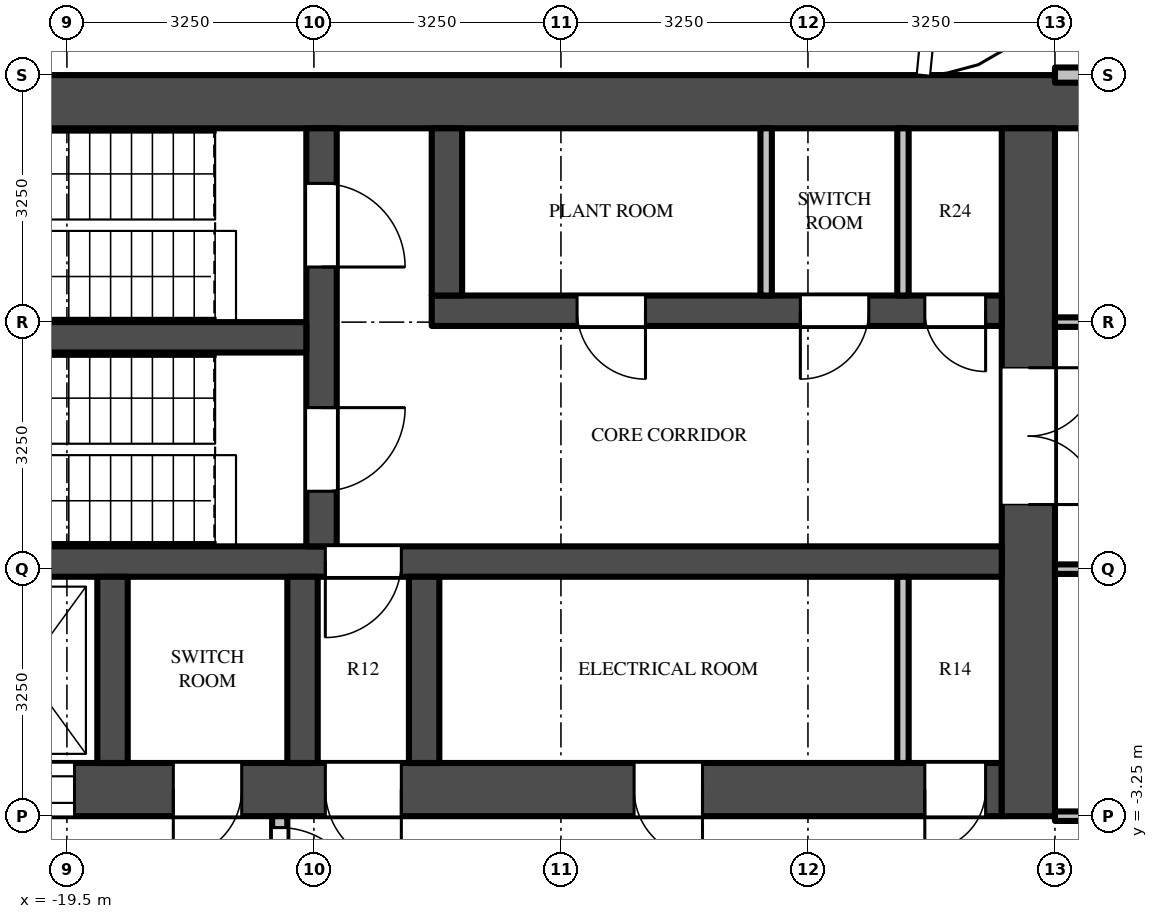
"""IFC4 building model, lengths in metres.
Left out: names, types, materials, properties, quantities, classifications, styles, units other than length and angle.
Written with IfcOpenShell. Run it as: python <this file> out.ifc"""

import sys

from ifc_helpers import new_model, si_unit, direction, frame, frame_2d, origin, place, context, subcontext, project, spatial, rectangle, extrude, source, transform, mapped, element, fill, save


model = new_model("IFC4")
c1 = context("Model", 3, precision=1e-05, world=origin(), true_north=direction((0.0, 1.0)))
c2 = subcontext(c1, "Body", "Model", "MODEL_VIEW")
j1 = project(units=[si_unit("LENGTHUNIT", "METRE"), si_unit("PLANEANGLEUNIT", "RADIAN")], contexts=[c1])
p1 = place(None, origin())
s1 = spatial("IfcSite", under=j1, at=p1, CompositionType="ELEMENT")
p2 = place(p1, origin())
s2 = spatial("IfcBuilding", under=s1, at=p2, CompositionType="ELEMENT")
p3 = place(p2, frame((0.0, 0.0, 354.1)))
s3 = spatial("IfcBuildingStorey", under=s2, at=p3, CompositionType="ELEMENT", Elevation=354.1)
m1 = source(origin(), c2, "Body", "SweptSolid", [
    extrude(rectangle(XDim=16.75, YDim=0.7, at=frame_2d((8.375, 0.0))), origin(), (0.0, 0.0, 1.0), 3.75),
])
p4 = place(p3, frame((-6.0, 6.15, 0.0), z_axis=(0.0, 0.0, 1.0), x_axis=(-1.0, 0.0, 0.0)))
e1 = element("IfcWall", 1, at=p4, inside=s3, PredefinedType="SHEAR", context=c2, shape_type="MappedRepresentation", body=[
    mapped(m1, transform((0.0, 0.0, 0.0))),
])
m2 = source(origin(), c2, "Body", "SweptSolid", [
    extrude(rectangle(XDim=14.85, YDim=0.7, at=frame_2d((7.425, 0.0))), origin(), (0.0, 0.0, 1.0), 3.75),
])
p5 = place(p3, frame((-7.2, -2.9, 0.0), z_axis=(0.0, 0.0, 1.0), x_axis=(-1.0, 0.0, 0.0)))
e2 = element("IfcWall", 2, at=p5, inside=s3, PredefinedType="SHEAR", context=c2, shape_type="MappedRepresentation", body=[
    mapped(m2, transform((0.0, 0.0, 0.0))),
])
m3 = source(origin(), c2, "Body", "SweptSolid", [
    extrude(rectangle(XDim=1.3, YDim=2.1, at=frame_2d((0.65, 1.05))), frame((0.0, 0.36, 0.0), z_axis=(0.0, -1.0, 0.0), x_axis=(1.0, 0.0, 0.0)), (0.0, 0.0, 1.0), 0.72),
])
p6 = place(p5, frame((12.2, 0.0, 0.0)))
e3 = element("IfcOpeningElement", 3, at=p6, cuts=e2, PredefinedType="OPENING", context=c2, shape_type="MappedRepresentation", body=[
    mapped(m3, transform((0.0, 0.0, 0.0))),
])
m4 = source(origin(), c2, "Body", "SweptSolid", [
    extrude(rectangle(XDim=1.0, YDim=2.1, at=frame_2d((0.5, 1.05))), frame((0.0, 0.36, 0.0), z_axis=(0.0, -1.0, 0.0), x_axis=(1.0, 0.0, 0.0)), (0.0, 0.0, 1.0), 0.72),
])
p7 = place(p5, frame((7.9, 0.0, 0.0)))
e4 = element("IfcOpeningElement", 4, at=p7, cuts=e2, PredefinedType="OPENING", context=c2, shape_type="MappedRepresentation", body=[
    mapped(m4, transform((0.0, 0.0, 0.0))),
])
m5 = source(origin(), c2, "Body", "SweptSolid", [
    extrude(rectangle(XDim=0.8, YDim=2.1, at=frame_2d((0.4, 1.05))), frame((0.0, 0.36, 0.0), z_axis=(0.0, -1.0, 0.0), x_axis=(1.0, 0.0, 0.0)), (0.0, 0.0, 1.0), 0.72),
])
p8 = place(p5, frame((0.212, 0.0, 0.0)))
e5 = element("IfcOpeningElement", 5, at=p8, cuts=e2, PredefinedType="OPENING", context=c2, shape_type="MappedRepresentation", body=[
    mapped(m5, transform((0.0, 0.0, 0.0))),
])
m6 = source(origin(), c2, "Body", "SweptSolid", [
    extrude(rectangle(XDim=0.9, YDim=2.1, at=frame_2d((0.45, 1.05))), frame((0.0, 0.36, 0.0), z_axis=(0.0, -1.0, 0.0), x_axis=(1.0, 0.0, 0.0)), (0.0, 0.0, 1.0), 0.72),
])
p9 = place(p5, frame((3.938, 0.0, 0.0)))
e6 = element("IfcOpeningElement", 6, at=p9, cuts=e2, PredefinedType="OPENING", context=c2, shape_type="MappedRepresentation", body=[
    mapped(m6, transform((0.0, 0.0, 0.0))),
])
p10 = place(p5, frame((10.0, 0.0, 0.0)))
e7 = element("IfcOpeningElement", 7, at=p10, cuts=e2, PredefinedType="OPENING", context=c2, shape_type="MappedRepresentation", body=[
    mapped(m6, transform((0.0, 0.0, 0.0))),
])
m7 = source(origin(), c2, "Body", "SweptSolid", [
    extrude(rectangle(XDim=9.05, YDim=0.7, at=frame_2d((4.525, 0.0))), origin(), (0.0, 0.0, 1.0), 3.75),
])
p11 = place(p3, frame((-6.85, 5.8, 0.0), z_axis=(0.0, 0.0, 1.0), x_axis=(0.0, -1.0, 0.0)))
e8 = element("IfcWall", 8, at=p11, inside=s3, PredefinedType="SHEAR", context=c2, shape_type="MappedRepresentation", body=[
    mapped(m7, transform((0.0, 0.0, 0.0))),
])
m8 = source(origin(), c2, "Body", "SweptSolid", [
    extrude(rectangle(XDim=1.8, YDim=2.1, at=frame_2d((0.9, 1.05))), frame((0.0, 0.36, 0.0), z_axis=(0.0, -1.0, 0.0), x_axis=(1.0, 0.0, 0.0)), (0.0, 0.0, 1.0), 0.72),
])
p12 = place(p11, frame((3.15, 0.0, 0.0)))
e9 = element("IfcOpeningElement", 9, at=p12, cuts=e8, PredefinedType="OPENING", context=c2, shape_type="MappedRepresentation", body=[
    mapped(m8, transform((0.0, 0.0, 0.0))),
])
m9 = source(origin(), c2, "Body", "SweptSolid", [
    extrude(rectangle(XDim=7.5, YDim=0.4, at=frame_2d((3.75, 0.0))), origin(), (0.0, 0.0, 1.0), 3.75),
])
p13 = place(p3, frame((-7.2, 3.4, 0.0), z_axis=(0.0, 0.0, 1.0), x_axis=(-1.0, 0.0, 0.0)))
e10 = element("IfcWall", 10, at=p13, inside=s3, PredefinedType="SHEAR", context=c2, shape_type="MappedRepresentation", body=[
    mapped(m9, transform((0.0, 0.0, 0.0))),
])
m10 = source(origin(), c2, "Body", "SweptSolid", [
    extrude(rectangle(XDim=0.8, YDim=2.1, at=frame_2d((0.4, 1.05))), frame((0.0, 0.21, 0.0), z_axis=(0.0, -1.0, 0.0), x_axis=(1.0, 0.0, 0.0)), (0.0, 0.0, 1.0), 0.42),
])
p14 = place(p13, frame((0.212, 0.0, 0.0)))
e11 = element("IfcOpeningElement", 11, at=p14, cuts=e10, PredefinedType="OPENING", context=c2, shape_type="MappedRepresentation", body=[
    mapped(m10, transform((0.0, 0.0, 0.0))),
])
m11 = source(origin(), c2, "Body", "SweptSolid", [
    extrude(rectangle(XDim=0.9, YDim=2.1, at=frame_2d((0.45, 1.05))), frame((0.0, 0.21, 0.0), z_axis=(0.0, -1.0, 0.0), x_axis=(1.0, 0.0, 0.0)), (0.0, 0.0, 1.0), 0.42),
])
p15 = place(p13, frame((1.75, 0.0, 0.0)))
e12 = element("IfcOpeningElement", 12, at=p15, cuts=e10, PredefinedType="OPENING", context=c2, shape_type="MappedRepresentation", body=[
    mapped(m11, transform((0.0, 0.0, 0.0))),
])
p16 = place(p13, frame((4.688, 0.0, 0.0)))
e13 = element("IfcOpeningElement", 13, at=p16, cuts=e10, PredefinedType="OPENING", context=c2, shape_type="MappedRepresentation", body=[
    mapped(m11, transform((0.0, 0.0, 0.0))),
])
m12 = source(origin(), c2, "Body", "SweptSolid", [
    extrude(rectangle(XDim=14.85, YDim=0.4, at=frame_2d((7.425, 0.0))), origin(), (0.0, 0.0, 1.0), 3.75),
])
p17 = place(p3, frame((-7.2, 0.1, 0.0), z_axis=(0.0, 0.0, 1.0), x_axis=(-1.0, 0.0, 0.0)))
e14 = element("IfcWall", 14, at=p17, inside=s3, PredefinedType="SHEAR", context=c2, shape_type="MappedRepresentation", body=[
    mapped(m12, transform((0.0, 0.0, 0.0))),
])
m13 = source(origin(), c2, "Body", "SweptSolid", [
    extrude(rectangle(XDim=1.0, YDim=2.1, at=frame_2d((0.5, 1.05))), frame((0.0, 0.21, 0.0), z_axis=(0.0, -1.0, 0.0), x_axis=(1.0, 0.0, 0.0)), (0.0, 0.0, 1.0), 0.42),
])
p18 = place(p17, frame((7.9, 0.0, 0.0)))
e15 = element("IfcOpeningElement", 15, at=p18, cuts=e14, PredefinedType="OPENING", context=c2, shape_type="MappedRepresentation", body=[
    mapped(m13, transform((0.0, 0.0, 0.0))),
])
m14 = source(origin(), c2, "Body", "SweptSolid", [
    extrude(rectangle(XDim=5.5, YDim=0.4, at=frame_2d((2.75, 0.0))), origin(), (0.0, 0.0, 1.0), 3.75),
])
p19 = place(p3, frame((-16.15, 5.8, 0.0), z_axis=(0.0, 0.0, 1.0), x_axis=(0.0, -1.0, 0.0)))
e16 = element("IfcWall", 16, at=p19, inside=s3, PredefinedType="SHEAR", context=c2, shape_type="MappedRepresentation", body=[
    mapped(m14, transform((0.0, 0.0, 0.0))),
])
m15 = source(origin(), c2, "Body", "SweptSolid", [
    extrude(rectangle(XDim=1.1, YDim=2.1, at=frame_2d((0.55, 1.05))), frame((0.0, 0.21, 0.0), z_axis=(0.0, -1.0, 0.0), x_axis=(1.0, 0.0, 0.0)), (0.0, 0.0, 1.0), 0.42),
])
p20 = place(p19, frame((0.725, 0.0, 0.0)))
e17 = element("IfcOpeningElement", 17, at=p20, cuts=e16, PredefinedType="OPENING", context=c2, shape_type="MappedRepresentation", body=[
    mapped(m15, transform((0.0, 0.0, 0.0))),
])
p21 = place(p19, frame((3.675, 0.0, 0.0)))
e18 = element("IfcOpeningElement", 18, at=p21, cuts=e16, PredefinedType="OPENING", context=c2, shape_type="MappedRepresentation", body=[
    mapped(m15, transform((0.0, 0.0, 0.0))),
])
m16 = source(origin(), c2, "Body", "SweptSolid", [
    extrude(rectangle(XDim=5.7, YDim=0.4, at=frame_2d((2.85, 0.0))), origin(), (0.0, 0.0, 1.0), 3.75),
])
p22 = place(p3, frame((-16.35, 3.05, 0.0), z_axis=(0.0, 0.0, 1.0), x_axis=(-1.0, 0.0, 0.0)))
e19 = element("IfcWall", 19, at=p22, inside=s3, PredefinedType="SHEAR", context=c2, shape_type="MappedRepresentation", body=[
    mapped(m16, transform((0.0, 0.0, 0.0))),
])
m17 = source(origin(), c2, "Body", "SweptSolid", [
    extrude(rectangle(XDim=2.2, YDim=0.4, at=frame_2d((1.1, 0.0))), origin(), (0.0, 0.0, 1.0), 3.75),
])
p23 = place(p3, frame((-14.5, 5.8, 0.0), z_axis=(0.0, 0.0, 1.0), x_axis=(0.0, -1.0, 0.0)))
e20 = element("IfcWall", 20, at=p23, inside=s3, PredefinedType="SHEAR", context=c2, shape_type="MappedRepresentation", body=[
    mapped(m17, transform((0.0, 0.0, 0.0))),
])
m18 = source(origin(), c2, "Body", "SweptSolid", [
    extrude(rectangle(XDim=2.45, YDim=0.4, at=frame_2d((1.225, 0.0))), origin(), (0.0, 0.0, 1.0), 3.75),
])
for number, where, z_axis, x_axis in (
    (21, (-14.8, -0.1, 0.0), (0.0, 0.0, 1.0), (0.0, -1.0, 0.0)),
    (22, (-16.4, -0.1, 0.0), (0.0, 0.0, 1.0), (0.0, -1.0, 0.0)),
    (23, (-18.9, -0.1, 0.0), (0.0, 0.0, 1.0), (0.0, -1.0, 0.0)),
):
    element("IfcWall", number, at=place(p3, frame(where, z_axis=z_axis, x_axis=x_axis)), inside=s3, PredefinedType="SHEAR", context=c2, shape_type="MappedRepresentation", body=[
        mapped(m18, transform((0.0, 0.0, 0.0))),
    ])
m19 = source(origin(), c2, "Body", "SweptSolid", [
    extrude(rectangle(XDim=3.25, YDim=0.2, at=frame_2d((1.625, 0.0))), origin(), (0.0, 0.0, 1.0), 3.75),
])
p24 = place(p3, frame((-16.7, -3.25, 0.0), z_axis=(0.0, 0.0, 1.0), x_axis=(0.0, -1.0, 0.0)))
e24 = element("IfcWall", 24, at=p24, inside=s3, PredefinedType="PARTITIONING", context=c2, shape_type="MappedRepresentation", body=[
    mapped(m19, transform((0.0, 0.0, 0.0))),
])
m20 = source(origin(), c2, "Body", "SweptSolid", [
    extrude(rectangle(XDim=1.1, YDim=2.1, at=frame_2d((0.55, 1.05))), frame((0.0, 0.11, 0.0), z_axis=(0.0, -1.0, 0.0), x_axis=(1.0, 0.0, 0.0)), (0.0, 0.0, 1.0), 0.22),
])
p25 = place(p24, frame((0.15, 0.0, 0.0)))
e25 = element("IfcOpeningElement", 25, at=p25, cuts=e24, PredefinedType="OPENING", context=c2, shape_type="MappedRepresentation", body=[
    mapped(m20, transform((0.0, 0.0, 0.0))),
])
m21 = source(origin(), c2, "Body", "SweptSolid", [
    extrude(rectangle(XDim=2.2, YDim=0.15, at=frame_2d((1.1, 0.0))), origin(), (0.0, 0.0, 1.0), 3.75),
])
for number, where, z_axis, x_axis in (
    (26, (-8.5, 5.8, 0.0), (0.0, 0.0, 1.0), (0.0, -1.0, 0.0)),
    (27, (-10.3, 5.8, 0.0), (0.0, 0.0, 1.0), (0.0, -1.0, 0.0)),
):
    element("IfcWall", number, at=place(p3, frame(where, z_axis=z_axis, x_axis=x_axis)), inside=s3, PredefinedType="PARTITIONING", context=c2, shape_type="MappedRepresentation", body=[
        mapped(m21, transform((0.0, 0.0, 0.0))),
    ])
m22 = source(origin(), c2, "Body", "SweptSolid", [
    extrude(rectangle(XDim=2.45, YDim=0.15, at=frame_2d((1.225, 0.0))), origin(), (0.0, 0.0, 1.0), 3.75),
])
p26 = place(p3, frame((-8.5, -0.1, 0.0), z_axis=(0.0, 0.0, 1.0), x_axis=(0.0, -1.0, 0.0)))
e28 = element("IfcWall", 28, at=p26, inside=s3, PredefinedType="PARTITIONING", context=c2, shape_type="MappedRepresentation", body=[
    mapped(m22, transform((0.0, 0.0, 0.0))),
])
m23 = source(origin(), c2, "Body", "SweptSolid", [
    extrude(rectangle(XDim=5.363, YDim=0.125, at=frame_2d((2.681, 0.0))), origin(), (0.0, 0.0, 1.0), 3.046),
])
p27 = place(p3, frame((-1.137, -3.25, 0.0), z_axis=(0.0, 0.0, 1.0), x_axis=(-1.0, 0.0, 0.0)))
e29 = element("IfcWall", 29, at=p27, inside=s3, PredefinedType="PARTITIONING", context=c2, shape_type="MappedRepresentation", body=[
    mapped(m23, transform((0.0, 0.0, 0.0))),
])
m24 = source(origin(), c2, "Body", "SweptSolid", [
    extrude(rectangle(XDim=1.0, YDim=2.1, at=frame_2d((0.5, 1.05))), frame((0.0, 0.073, 0.0), z_axis=(0.0, -1.0, 0.0), x_axis=(1.0, 0.0, 0.0)), (0.0, 0.0, 1.0), 0.145),
])
p28 = place(p27, frame((4.012, 0.0, 0.0)))
e30 = element("IfcOpeningElement", 30, at=p28, cuts=e29, PredefinedType="OPENING", context=c2, shape_type="MappedRepresentation", body=[
    mapped(m24, transform((0.0, 0.0, 0.0))),
])
p29 = place(p3, frame((-1.137, 0.0, 0.0), z_axis=(0.0, 0.0, 1.0), x_axis=(-1.0, 0.0, 0.0)))
e31 = element("IfcWall", 31, at=p29, inside=s3, PredefinedType="PARTITIONING", context=c2, shape_type="MappedRepresentation", body=[
    mapped(m23, transform((0.0, 0.0, 0.0))),
])
p30 = place(p3, frame((-6.5, 3.25, 0.0), z_axis=(0.0, 0.0, 1.0), x_axis=(1.0, 0.0, 0.0)))
e32 = element("IfcWall", 32, at=p30, inside=s3, PredefinedType="PARTITIONING", context=c2, shape_type="MappedRepresentation", body=[
    mapped(m23, transform((0.0, 0.0, 0.0))),
])
p31 = place(p30, frame((1.3, 0.0, 0.0)))
e33 = element("IfcOpeningElement", 33, at=p31, cuts=e32, PredefinedType="OPENING", context=c2, shape_type="MappedRepresentation", body=[
    mapped(m24, transform((0.0, 0.0, 0.0))),
])
m25 = source(origin(), c2, "Body", "SweptSolid", [
    extrude(rectangle(XDim=5.363, YDim=0.2, at=frame_2d((2.681, 0.0))), origin(), (0.0, 0.0, 1.0), 2.83),
])
p32 = place(p3, frame((-6.5, 6.5, 0.0), z_axis=(0.0, 0.0, 1.0), x_axis=(1.0, 0.0, 0.0)))
e34 = element("IfcWall", 34, at=p32, inside=s3, PredefinedType="PARTITIONING", context=c2, shape_type="MappedRepresentation", body=[
    mapped(m25, transform((0.0, 0.0, 0.0))),
])
m26 = source(origin(), c2, "Body", "SweptSolid", [
    extrude(rectangle(XDim=1.3, YDim=2.1, at=frame_2d((0.65, 1.05))), frame((0.0, -0.275, 0.0), z_axis=(0.0, -1.0, 0.0), x_axis=(1.0, 0.0, 0.0)), (0.0, 0.0, 1.0), 0.05),
])
p33 = place(p6, origin())
e35 = element("IfcDoor", 35, at=p33, inside=s3, OperationType="DOUBLE_DOOR_SLIDING", PredefinedType="DOOR", context=c2, shape_type="MappedRepresentation", body=[
    mapped(m26, transform((0.0, 0.0, 0.0))),
])
fill(e3, e35)
m27 = source(origin(), c2, "Body", "SweptSolid", [
    extrude(rectangle(XDim=1.8, YDim=2.1, at=frame_2d((0.9, 1.05))), frame((0.0, -0.275, 0.0), z_axis=(0.0, -1.0, 0.0), x_axis=(1.0, 0.0, 0.0)), (0.0, 0.0, 1.0), 0.05),
])
p34 = place(p12, origin())
e36 = element("IfcDoor", 36, at=p34, inside=s3, OperationType="DOUBLE_DOOR_SINGLE_SWING", PredefinedType="DOOR", context=c2, shape_type="MappedRepresentation", body=[
    mapped(m27, transform((0.0, 0.0, 0.0))),
])
fill(e9, e36)
m28 = source(origin(), c2, "Body", "SweptSolid", [
    extrude(rectangle(XDim=1.1, YDim=2.1, at=frame_2d((0.55, 1.05))), frame((0.0, 0.025, 0.0), z_axis=(0.0, -1.0, 0.0), x_axis=(1.0, 0.0, 0.0)), (0.0, 0.0, 1.0), 0.05),
])
p35 = place(p20, origin())
e37 = element("IfcDoor", 37, at=p35, inside=s3, OperationType="SINGLE_SWING_RIGHT", PredefinedType="DOOR", context=c2, shape_type="MappedRepresentation", body=[
    mapped(m28, transform((0.0, 0.0, 0.0))),
])
fill(e17, e37)
p36 = place(p21, origin())
e38 = element("IfcDoor", 38, at=p36, inside=s3, OperationType="SINGLE_SWING_LEFT", PredefinedType="DOOR", context=c2, shape_type="MappedRepresentation", body=[
    mapped(m28, transform((0.0, 0.0, 0.0))),
])
fill(e18, e38)
m29 = source(origin(), c2, "Body", "SweptSolid", [
    extrude(rectangle(XDim=1.0, YDim=2.1, at=frame_2d((0.5, 1.05))), frame((0.0, 0.025, 0.0), z_axis=(0.0, -1.0, 0.0), x_axis=(1.0, 0.0, 0.0)), (0.0, 0.0, 1.0), 0.05),
])
p37 = place(p18, origin())
e39 = element("IfcDoor", 39, at=p37, inside=s3, OperationType="SINGLE_SWING_RIGHT", PredefinedType="DOOR", context=c2, shape_type="MappedRepresentation", body=[
    mapped(m29, transform((0.0, 0.0, 0.0))),
])
fill(e15, e39)
m30 = source(origin(), c2, "Body", "SweptSolid", [
    extrude(rectangle(XDim=1.0, YDim=2.1, at=frame_2d((0.5, 1.05))), frame((0.0, -0.275, 0.0), z_axis=(0.0, -1.0, 0.0), x_axis=(1.0, 0.0, 0.0)), (0.0, 0.0, 1.0), 0.05),
])
p38 = place(p7, origin())
e40 = element("IfcDoor", 40, at=p38, inside=s3, OperationType="SINGLE_SWING_LEFT", PredefinedType="DOOR", context=c2, shape_type="MappedRepresentation", body=[
    mapped(m30, transform((0.0, 0.0, 0.0))),
])
fill(e4, e40)
p39 = place(p25, origin())
e41 = element("IfcDoor", 41, at=p39, inside=s3, OperationType="SINGLE_SWING_RIGHT", PredefinedType="DOOR", context=c2, shape_type="MappedRepresentation", body=[
    mapped(m28, transform((0.0, 0.0, 0.0))),
])
fill(e25, e41)
m31 = source(origin(), c2, "Body", "SweptSolid", [
    extrude(rectangle(XDim=0.8, YDim=2.1, at=frame_2d((0.4, 1.05))), frame((0.0, 0.025, 0.0), z_axis=(0.0, -1.0, 0.0), x_axis=(1.0, 0.0, 0.0)), (0.0, 0.0, 1.0), 0.05),
])
p40 = place(p14, origin())
e42 = element("IfcDoor", 42, at=p40, inside=s3, OperationType="SINGLE_SWING_LEFT", PredefinedType="DOOR", context=c2, shape_type="MappedRepresentation", body=[
    mapped(m31, transform((0.0, 0.0, 0.0))),
])
fill(e11, e42)
m32 = source(origin(), c2, "Body", "SweptSolid", [
    extrude(rectangle(XDim=0.9, YDim=2.1, at=frame_2d((0.45, 1.05))), frame((0.0, 0.025, 0.0), z_axis=(0.0, -1.0, 0.0), x_axis=(1.0, 0.0, 0.0)), (0.0, 0.0, 1.0), 0.05),
])
p41 = place(p15, origin())
e43 = element("IfcDoor", 43, at=p41, inside=s3, OperationType="SINGLE_SWING_RIGHT", PredefinedType="DOOR", context=c2, shape_type="MappedRepresentation", body=[
    mapped(m32, transform((0.0, 0.0, 0.0))),
])
fill(e12, e43)
p42 = place(p16, origin())
e44 = element("IfcDoor", 44, at=p42, inside=s3, OperationType="SINGLE_SWING_LEFT", PredefinedType="DOOR", context=c2, shape_type="MappedRepresentation", body=[
    mapped(m32, transform((0.0, 0.0, 0.0))),
])
fill(e13, e44)
m33 = source(origin(), c2, "Body", "SweptSolid", [
    extrude(rectangle(XDim=0.8, YDim=2.1, at=frame_2d((0.4, 1.05))), frame((0.0, -0.275, 0.0), z_axis=(0.0, -1.0, 0.0), x_axis=(1.0, 0.0, 0.0)), (0.0, 0.0, 1.0), 0.05),
])
p43 = place(p8, origin())
e45 = element("IfcDoor", 45, at=p43, inside=s3, OperationType="SINGLE_SWING_RIGHT", PredefinedType="DOOR", context=c2, shape_type="MappedRepresentation", body=[
    mapped(m33, transform((0.0, 0.0, 0.0))),
])
fill(e5, e45)
m34 = source(origin(), c2, "Body", "SweptSolid", [
    extrude(rectangle(XDim=0.9, YDim=2.1, at=frame_2d((0.45, 1.05))), frame((0.0, -0.275, 0.0), z_axis=(0.0, -1.0, 0.0), x_axis=(1.0, 0.0, 0.0)), (0.0, 0.0, 1.0), 0.05),
])
p44 = place(p9, origin())
e46 = element("IfcDoor", 46, at=p44, inside=s3, OperationType="SINGLE_SWING_LEFT", PredefinedType="DOOR", context=c2, shape_type="MappedRepresentation", body=[
    mapped(m34, transform((0.0, 0.0, 0.0))),
])
fill(e6, e46)
p45 = place(p10, origin())
e47 = element("IfcDoor", 47, at=p45, inside=s3, OperationType="SINGLE_SWING_RIGHT", PredefinedType="DOOR", context=c2, shape_type="MappedRepresentation", body=[
    mapped(m34, transform((0.0, 0.0, 0.0))),
])
fill(e7, e47)
save(model, sys.argv[1])
